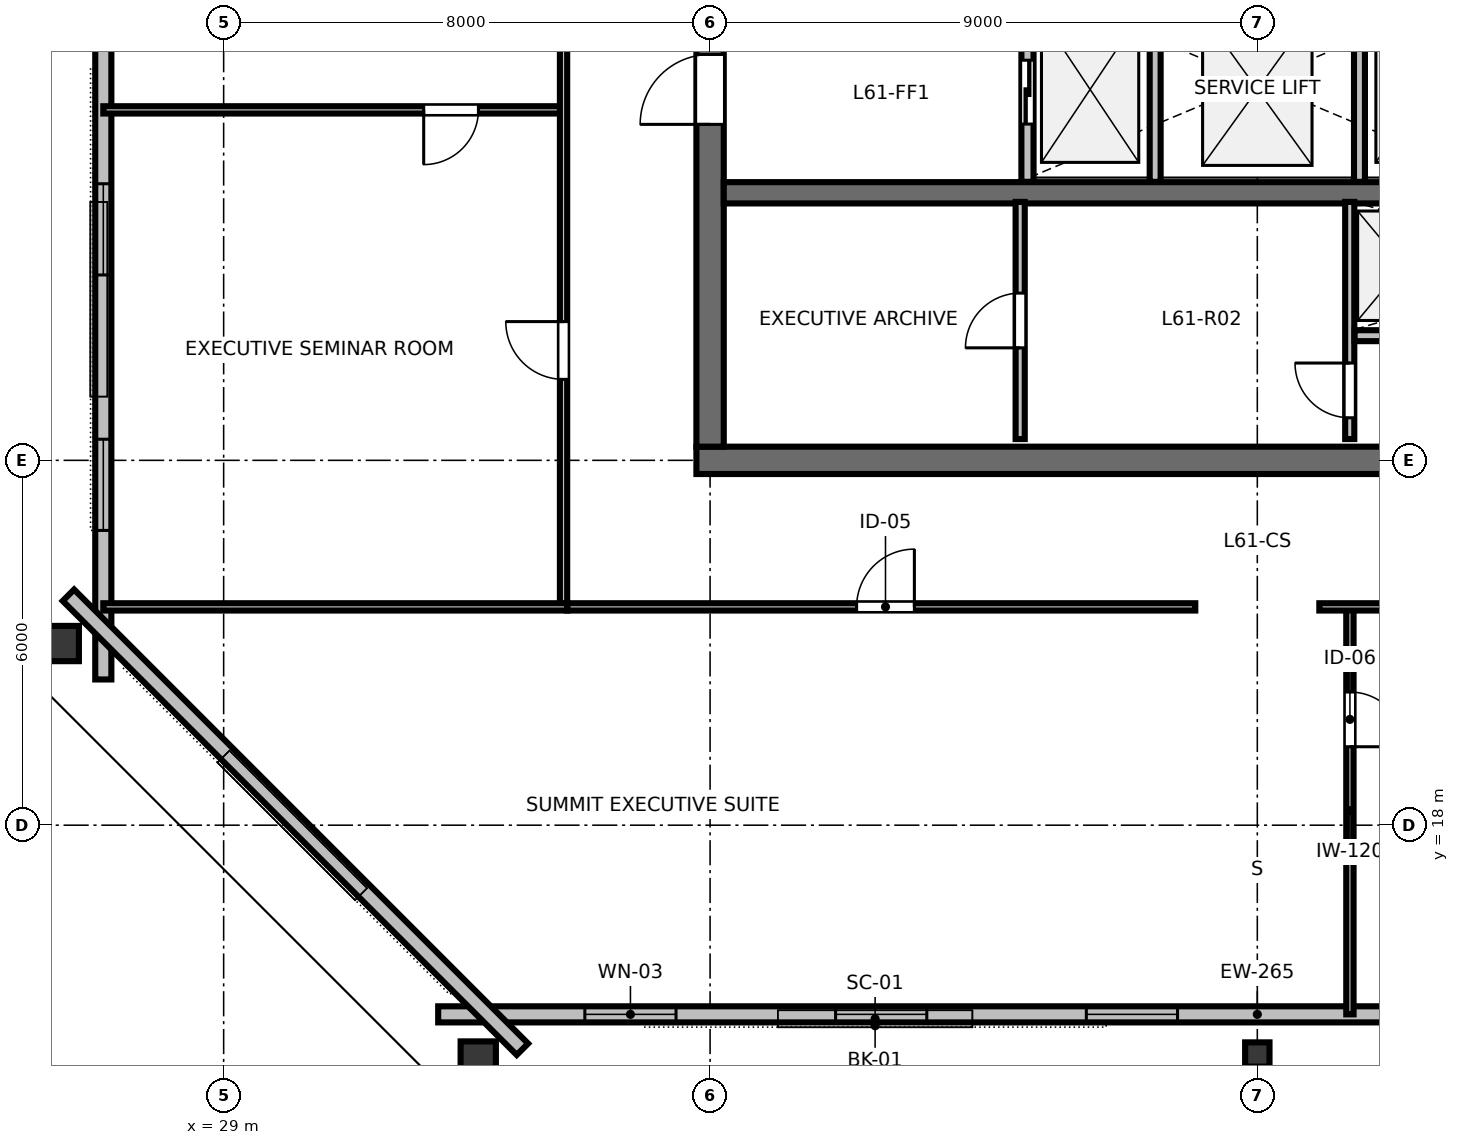
"""IFC4 building model, lengths in metres.
Left out: names, types, materials, properties, quantities, classifications, styles, units other than length and angle.
Written with IfcOpenShell. Run it as: python <this file> out.ifc"""

import sys

from ifc_helpers import new_model, si_unit, direction, frame, frame_2d, origin, origin_2d, place, context, subcontext, project, spatial, rectangle, hollow_rectangle, i_section, extrude, element, fill, save


model = new_model("IFC4")
c1 = context("Model", 3, precision=1e-05, world=origin(), true_north=direction((0.0, 1.0)))
c2 = subcontext(c1, "Body", "Model", "MODEL_VIEW")
j1 = project(units=[si_unit("LENGTHUNIT", "METRE"), si_unit("PLANEANGLEUNIT", "RADIAN")], contexts=[c1])
p1 = place(None, origin())
s1 = spatial("IfcSite", under=j1, at=p1, CompositionType="ELEMENT")
p2 = place(p1, origin())
s2 = spatial("IfcBuilding", under=s1, at=p2, CompositionType="ELEMENT")
p3 = place(p2, frame((0.0, 0.0, 231.0)))
s3 = spatial("IfcBuildingStorey", under=s2, at=p3, CompositionType="ELEMENT", Elevation=231.0)
p4 = place(p3, frame((36.775, 24.0, 0.0), z_axis=(0.0, 0.0, 1.0), x_axis=(1.0, 0.0, 0.0)))
e1 = element("IfcWall", 1, at=p4, inside=s3, PredefinedType="SHEAR", context=c2, shape_type="SweptSolid", body=[
    extrude(rectangle(XDim=18.45, YDim=0.45, at=frame_2d((9.225, 0.0))), origin(), (0.0, 0.0, 1.0), 3.28),
])
p5 = place(p4, frame((13.425, 0.0, 0.0)))
e2 = element("IfcOpeningElement", 2, at=p5, cuts=e1, PredefinedType="OPENING", context=c2, shape_type="SweptSolid", body=[
    extrude(rectangle(XDim=1.6, YDim=2.15, at=frame_2d((0.8, 1.075))), frame((0.0, 0.235, 0.0), z_axis=(0.0, -1.0, 0.0), x_axis=(1.0, 0.0, 0.0)), (0.0, 0.0, 1.0), 0.47),
])
p6 = place(p3, frame((37.0, 24.225, 0.0), z_axis=(0.0, 0.0, 1.0), x_axis=(0.0, 1.0, 0.0)))
e3 = element("IfcWall", 3, at=p6, inside=s3, PredefinedType="SHEAR", context=c2, shape_type="SweptSolid", body=[
    extrude(rectangle(XDim=15.55, YDim=0.45, at=frame_2d((7.775, 0.0))), origin(), (0.0, 0.0, 1.0), 3.28),
])
p7 = place(p6, frame((5.3, 0.0, 0.0)))
e4 = element("IfcOpeningElement", 4, at=p7, cuts=e3, PredefinedType="OPENING", context=c2, shape_type="SweptSolid", body=[
    extrude(rectangle(XDim=1.15, YDim=2.15, at=frame_2d((0.575, 1.075))), frame((0.0, 0.235, 0.0), z_axis=(0.0, -1.0, 0.0), x_axis=(1.0, 0.0, 0.0)), (0.0, 0.0, 1.0), 0.47),
])
p8 = place(p3, frame((37.225, 28.4, 0.0), z_axis=(0.0, 0.0, 1.0), x_axis=(1.0, 0.0, 0.0)))
e5 = element("IfcWall", 5, at=p8, inside=s3, PredefinedType="SHEAR", context=c2, shape_type="SweptSolid", body=[
    extrude(rectangle(XDim=17.55, YDim=0.35, at=frame_2d((8.775, 0.0))), origin(), (0.0, 0.0, 1.0), 3.28),
])
p9 = place(p3, frame((33.187, 14.094, 0.0), z_axis=(0.072351164075, 0.044894824887, 0.996368287209), x_axis=(-0.527254388164, 0.849707485057, 0.0)))
e6 = element("IfcColumn", 6, at=p9, inside=s3, PredefinedType="COLUMN", context=c2, shape_type="SweptSolid", body=[
    extrude(hollow_rectangle(XDim=0.58, YDim=0.7, WallThickness=0.032, at=origin_2d()), origin(), (0.0, 0.0, 1.0), 3.29),
])
p10 = place(p3, frame((46.0, 14.229, 0.0), z_axis=(0.0, 0.04434450837, 0.999016298454), x_axis=(-1.0, 0.0, 0.0)))
e7 = element("IfcColumn", 7, at=p10, inside=s3, PredefinedType="COLUMN", context=c2, shape_type="SweptSolid", body=[
    extrude(i_section(OverallWidth=0.401, OverallDepth=0.399, WebThickness=0.025, FlangeThickness=0.04, FilletRadius=0.025, at=origin_2d()), origin(), (0.0, 0.0, 1.0), 3.281),
])
p11 = place(p3, frame((26.27, 20.987, 0.0), z_axis=(0.062492571187, 0.054773773796, 0.996541274735), x_axis=(-0.749422115547, -0.656856913627, 0.083099264433)))
e8 = element("IfcColumn", 8, at=p11, inside=s3, PredefinedType="COLUMN", context=c2, shape_type="SweptSolid", body=[
    extrude(hollow_rectangle(XDim=0.58, YDim=0.7, WallThickness=0.032, at=origin_2d()), origin(), (0.0, 0.0, 1.0), 3.29),
])
p12 = place(p3, frame((32.528, 14.889, 0.0), z_axis=(0.0, 0.0, 1.0), x_axis=(1.0, 0.0, 0.0)))
e9 = element("IfcWall", 9, at=p12, inside=s3, PredefinedType="STANDARD", context=c2, shape_type="SweptSolid", body=[
    extrude(rectangle(XDim=26.943, YDim=0.265, at=frame_2d((13.472, 0.0))), origin(), (0.0, 0.0, 1.0), 3.28),
])
p13 = place(p12, frame((2.412, 0.0, 0.85)))
e10 = element("IfcOpeningElement", 10, at=p13, cuts=e9, PredefinedType="OPENING", context=c2, shape_type="SweptSolid", body=[
    extrude(rectangle(XDim=1.5, YDim=1.85, at=frame_2d((0.75, 0.925))), frame((0.0, 0.142, 0.0), z_axis=(0.0, -1.0, 0.0), x_axis=(1.0, 0.0, 0.0)), (0.0, 0.0, 1.0), 0.285),
])
p14 = place(p12, frame((6.536, 0.0, 0.85)))
e11 = element("IfcOpeningElement", 11, at=p14, cuts=e9, PredefinedType="OPENING", context=c2, shape_type="SweptSolid", body=[
    extrude(rectangle(XDim=1.5, YDim=1.85, at=frame_2d((0.75, 0.925))), frame((0.0, 0.142, 0.0), z_axis=(0.0, -1.0, 0.0), x_axis=(1.0, 0.0, 0.0)), (0.0, 0.0, 1.0), 0.285),
])
p15 = place(p12, frame((10.66, 0.0, 0.85)))
e12 = element("IfcOpeningElement", 12, at=p15, cuts=e9, PredefinedType="OPENING", context=c2, shape_type="SweptSolid", body=[
    extrude(rectangle(XDim=1.5, YDim=1.85, at=frame_2d((0.75, 0.925))), frame((0.0, 0.142, 0.0), z_axis=(0.0, -1.0, 0.0), x_axis=(1.0, 0.0, 0.0)), (0.0, 0.0, 1.0), 0.285),
])
p16 = place(p12, frame((18.908, 0.0, 0.85)))
e13 = element("IfcOpeningElement", 13, at=p16, cuts=e9, PredefinedType="OPENING", context=c2, shape_type="SweptSolid", body=[
    extrude(rectangle(XDim=1.5, YDim=1.85, at=frame_2d((0.75, 0.925))), frame((0.0, 0.142, 0.0), z_axis=(0.0, -1.0, 0.0), x_axis=(1.0, 0.0, 0.0)), (0.0, 0.0, 1.0), 0.285),
])
p17 = place(p12, frame((23.031, 0.0, 0.85)))
e14 = element("IfcOpeningElement", 14, at=p17, cuts=e9, PredefinedType="OPENING", context=c2, shape_type="SweptSolid", body=[
    extrude(rectangle(XDim=1.5, YDim=1.85, at=frame_2d((0.75, 0.925))), frame((0.0, 0.142, 0.0), z_axis=(0.0, -1.0, 0.0), x_axis=(1.0, 0.0, 0.0)), (0.0, 0.0, 1.0), 0.285),
])
p18 = place(p3, frame((27.021, 43.604, 0.0), z_axis=(0.0, 0.0, 1.0), x_axis=(0.0, -1.0, 0.0)))
e15 = element("IfcWall", 15, at=p18, inside=s3, PredefinedType="STANDARD", context=c2, shape_type="SweptSolid", body=[
    extrude(rectangle(XDim=23.207, YDim=0.265, at=frame_2d((11.604, 0.0))), origin(), (0.0, 0.0, 1.0), 3.28),
])
p19 = place(p18, frame((2.451, 0.0, 0.85)))
e16 = element("IfcOpeningElement", 16, at=p19, cuts=e15, PredefinedType="OPENING", context=c2, shape_type="SweptSolid", body=[
    extrude(rectangle(XDim=1.5, YDim=1.85, at=frame_2d((0.75, 0.925))), frame((0.0, 0.142, 0.0), z_axis=(0.0, -1.0, 0.0), x_axis=(1.0, 0.0, 0.0)), (0.0, 0.0, 1.0), 0.285),
])
p20 = place(p18, frame((6.652, 0.0, 0.85)))
e17 = element("IfcOpeningElement", 17, at=p20, cuts=e15, PredefinedType="OPENING", context=c2, shape_type="SweptSolid", body=[
    extrude(rectangle(XDim=1.5, YDim=1.85, at=frame_2d((0.75, 0.925))), frame((0.0, 0.142, 0.0), z_axis=(0.0, -1.0, 0.0), x_axis=(1.0, 0.0, 0.0)), (0.0, 0.0, 1.0), 0.285),
])
p21 = place(p18, frame((15.055, 0.0, 0.85)))
e18 = element("IfcOpeningElement", 18, at=p21, cuts=e15, PredefinedType="OPENING", context=c2, shape_type="SweptSolid", body=[
    extrude(rectangle(XDim=1.5, YDim=1.85, at=frame_2d((0.75, 0.925))), frame((0.0, 0.142, 0.0), z_axis=(0.0, -1.0, 0.0), x_axis=(1.0, 0.0, 0.0)), (0.0, 0.0, 1.0), 0.285),
])
p22 = place(p18, frame((19.257, 0.0, 0.85)))
e19 = element("IfcOpeningElement", 19, at=p22, cuts=e15, PredefinedType="OPENING", context=c2, shape_type="SweptSolid", body=[
    extrude(rectangle(XDim=1.5, YDim=1.85, at=frame_2d((0.75, 0.925))), frame((0.0, 0.142, 0.0), z_axis=(0.0, -1.0, 0.0), x_axis=(1.0, 0.0, 0.0)), (0.0, 0.0, 1.0), 0.285),
])
p23 = place(p3, frame((26.447, 21.782, 0.0), z_axis=(0.0, 0.0, 1.0), x_axis=(0.707106781187, -0.707106781187, 0.0)))
e20 = element("IfcWall", 20, at=p23, inside=s3, PredefinedType="STANDARD", context=c2, shape_type="SweptSolid", body=[
    extrude(rectangle(XDim=10.56, YDim=0.265, at=frame_2d((5.28, 0.0))), origin(), (0.0, 0.0, 1.0), 2.343),
])
p24 = place(p3, frame((42.22, 28.58, 0.0), z_axis=(0.0, 0.0, 1.0), x_axis=(0.0, 1.0, 0.0)))
e21 = element("IfcWall", 21, at=p24, inside=s3, PredefinedType="PARTITIONING", context=c2, shape_type="SweptSolid", body=[
    extrude(rectangle(XDim=3.04, YDim=0.2, at=frame_2d((1.52, 0.0))), origin(), (0.0, 0.0, 1.0), 3.28),
])
p25 = place(p24, frame((0.95, 0.0, 0.0)))
e22 = element("IfcOpeningElement", 22, at=p25, cuts=e21, PredefinedType="OPENING", context=c2, shape_type="SweptSolid", body=[
    extrude(rectangle(XDim=1.05, YDim=2.15, at=frame_2d((0.525, 1.075))), frame((0.0, 0.11, 0.0), z_axis=(0.0, -1.0, 0.0), x_axis=(1.0, 0.0, 0.0)), (0.0, 0.0, 1.0), 0.22),
])
for number, where, z_axis, x_axis in (
    (23, (44.32, 28.58, 0.0), (0.0, 0.0, 1.0), (0.0, 1.0, 0.0)),
    (24, (47.68, 28.58, 0.0), (0.0, 0.0, 1.0), (0.0, 1.0, 0.0)),
):
    element("IfcWall", number, at=place(p3, frame(where, z_axis=z_axis, x_axis=x_axis)), inside=s3, PredefinedType="PARTITIONING", context=c2, shape_type="SweptSolid", body=[
        extrude(rectangle(XDim=3.04, YDim=0.18, at=frame_2d((1.52, 0.0))), origin(), (0.0, 0.0, 1.0), 3.28),
    ])
p26 = place(p3, frame((42.1, 24.35, 0.0), z_axis=(0.0, 0.0, 1.0), x_axis=(0.0, 1.0, 0.0)))
e25 = element("IfcWall", 25, at=p26, inside=s3, PredefinedType="PARTITIONING", context=c2, shape_type="SweptSolid", body=[
    extrude(rectangle(XDim=3.9, YDim=0.15, at=frame_2d((1.95, 0.0))), origin(), (0.0, 0.0, 1.0), 3.28),
])
p27 = place(p26, frame((1.5, 0.0, 0.0)))
e26 = element("IfcOpeningElement", 26, at=p27, cuts=e25, PredefinedType="OPENING", context=c2, shape_type="SweptSolid", body=[
    extrude(rectangle(XDim=0.9, YDim=2.15, at=frame_2d((0.45, 1.075))), frame((0.0, 0.085, 0.0), z_axis=(0.0, -1.0, 0.0), x_axis=(1.0, 0.0, 0.0)), (0.0, 0.0, 1.0), 0.17),
])
p28 = place(p3, frame((47.52, 24.35, 0.0), z_axis=(0.0, 0.0, 1.0), x_axis=(0.0, 1.0, 0.0)))
e27 = element("IfcWall", 27, at=p28, inside=s3, PredefinedType="PARTITIONING", context=c2, shape_type="SweptSolid", body=[
    extrude(rectangle(XDim=3.9, YDim=0.15, at=frame_2d((1.95, 0.0))), origin(), (0.0, 0.0, 1.0), 3.28),
])
p29 = place(p28, frame((0.35, 0.0, 0.0)))
e28 = element("IfcOpeningElement", 28, at=p29, cuts=e27, PredefinedType="OPENING", context=c2, shape_type="SweptSolid", body=[
    extrude(rectangle(XDim=0.9, YDim=2.15, at=frame_2d((0.45, 1.075))), frame((0.0, 0.085, 0.0), z_axis=(0.0, -1.0, 0.0), x_axis=(1.0, 0.0, 0.0)), (0.0, 0.0, 1.0), 0.17),
])
p30 = place(p3, frame((47.6, 26.05, 0.0), z_axis=(0.0, 0.0, 1.0), x_axis=(1.0, 0.0, 0.0)))
e29 = element("IfcWall", 29, at=p30, inside=s3, PredefinedType="PARTITIONING", context=c2, shape_type="SweptSolid", body=[
    extrude(rectangle(XDim=7.0, YDim=0.18, at=frame_2d((3.5, 0.0))), origin(), (0.0, 0.0, 1.0), 3.28),
])
p31 = place(p30, frame((1.2, 0.0, 0.0)))
e30 = element("IfcOpeningElement", 30, at=p31, cuts=e29, PredefinedType="OPENING", context=c2, shape_type="SweptSolid", body=[
    extrude(rectangle(XDim=1.05, YDim=2.15, at=frame_2d((0.525, 1.075))), frame((0.0, 0.1, 0.0), z_axis=(0.0, -1.0, 0.0), x_axis=(1.0, 0.0, 0.0)), (0.0, 0.0, 1.0), 0.2),
])
p32 = place(p30, frame((3.4, 0.0, 0.0)))
e31 = element("IfcOpeningElement", 31, at=p32, cuts=e29, PredefinedType="OPENING", context=c2, shape_type="SweptSolid", body=[
    extrude(rectangle(XDim=1.05, YDim=2.15, at=frame_2d((0.525, 1.075))), frame((0.0, 0.1, 0.0), z_axis=(0.0, -1.0, 0.0), x_axis=(1.0, 0.0, 0.0)), (0.0, 0.0, 1.0), 0.2),
])
p33 = place(p3, frame((47.523, 21.59, 0.0), z_axis=(0.0, 0.0, 1.0), x_axis=(0.0, -1.0, 0.0)))
e32 = element("IfcWall", 32, at=p33, inside=s3, PredefinedType="PARTITIONING", context=c2, shape_type="SweptSolid", body=[
    extrude(rectangle(XDim=6.701, YDim=0.12, at=frame_2d((3.351, 0.0))), origin(), (0.0, 0.0, 1.0), 2.56),
])
p34 = place(p33, frame((1.4, 0.0, 0.0)))
e33 = element("IfcOpeningElement", 33, at=p34, cuts=e32, PredefinedType="OPENING", context=c2, shape_type="SweptSolid", body=[
    extrude(rectangle(XDim=0.9, YDim=2.15, at=frame_2d((0.45, 1.075))), frame((0.0, 0.07, 0.0), z_axis=(0.0, -1.0, 0.0), x_axis=(1.0, 0.0, 0.0)), (0.0, 0.0, 1.0), 0.14),
])
p35 = place(p3, frame((34.65, 21.59, 0.0), z_axis=(0.0, 0.0, 1.0), x_axis=(1.0, 0.0, 0.0)))
e34 = element("IfcWall", 34, at=p35, inside=s3, PredefinedType="PARTITIONING", context=c2, shape_type="SweptSolid", body=[
    extrude(rectangle(XDim=10.33, YDim=0.12, at=frame_2d((5.165, 0.0))), origin(), (0.0, 0.0, 1.0), 2.56),
])
p36 = place(p35, frame((4.76, 0.0, 0.0)))
e35 = element("IfcOpeningElement", 35, at=p36, cuts=e34, PredefinedType="OPENING", context=c2, shape_type="SweptSolid", body=[
    extrude(rectangle(XDim=0.95, YDim=2.15, at=frame_2d((0.475, 1.075))), frame((0.0, 0.07, 0.0), z_axis=(0.0, -1.0, 0.0), x_axis=(1.0, 0.0, 0.0)), (0.0, 0.0, 1.0), 0.14),
])
p37 = place(p3, frame((47.02, 21.59, 0.0), z_axis=(0.0, 0.0, 1.0), x_axis=(1.0, 0.0, 0.0)))
e36 = element("IfcWall", 36, at=p37, inside=s3, PredefinedType="PARTITIONING", context=c2, shape_type="SweptSolid", body=[
    extrude(rectangle(XDim=10.33, YDim=0.12, at=frame_2d((5.165, 0.0))), origin(), (0.0, 0.0, 1.0), 2.56),
])
p38 = place(p37, frame((4.872, 0.0, 0.0)))
e37 = element("IfcOpeningElement", 37, at=p38, cuts=e36, PredefinedType="OPENING", context=c2, shape_type="SweptSolid", body=[
    extrude(rectangle(XDim=0.95, YDim=2.15, at=frame_2d((0.475, 1.075))), frame((0.0, 0.07, 0.0), z_axis=(0.0, -1.0, 0.0), x_axis=(1.0, 0.0, 0.0)), (0.0, 0.0, 1.0), 0.14),
])
p39 = place(p3, frame((34.59, 29.763, 0.0), z_axis=(0.0, 0.0, 1.0), x_axis=(-1.0, 0.0, 0.0)))
e38 = element("IfcWall", 38, at=p39, inside=s3, PredefinedType="PARTITIONING", context=c2, shape_type="SweptSolid", body=[
    extrude(rectangle(XDim=7.569, YDim=0.12, at=frame_2d((3.785, 0.0))), origin(), (0.0, 0.0, 1.0), 2.56),
])
p40 = place(p39, frame((1.4, 0.0, 0.0)))
e39 = element("IfcOpeningElement", 39, at=p40, cuts=e38, PredefinedType="OPENING", context=c2, shape_type="SweptSolid", body=[
    extrude(rectangle(XDim=0.9, YDim=2.15, at=frame_2d((0.45, 1.075))), frame((0.0, 0.07, 0.0), z_axis=(0.0, -1.0, 0.0), x_axis=(1.0, 0.0, 0.0)), (0.0, 0.0, 1.0), 0.14),
])
p41 = place(p3, frame((34.59, 21.65, 0.0), z_axis=(0.0, 0.0, 1.0), x_axis=(0.0, 1.0, 0.0)))
e40 = element("IfcWall", 40, at=p41, inside=s3, PredefinedType="PARTITIONING", context=c2, shape_type="SweptSolid", body=[
    extrude(rectangle(XDim=20.7, YDim=0.12, at=frame_2d((10.35, 0.0))), origin(), (0.0, 0.0, 1.0), 2.56),
])
p42 = place(p41, frame((3.682, 0.0, 0.0)))
e41 = element("IfcOpeningElement", 41, at=p42, cuts=e40, PredefinedType="OPENING", context=c2, shape_type="SweptSolid", body=[
    extrude(rectangle(XDim=0.95, YDim=2.15, at=frame_2d((0.475, 1.075))), frame((0.0, 0.07, 0.0), z_axis=(0.0, -1.0, 0.0), x_axis=(1.0, 0.0, 0.0)), (0.0, 0.0, 1.0), 0.14),
])
p43 = place(p41, frame((13.832, 0.0, 0.0)))
e42 = element("IfcOpeningElement", 42, at=p43, cuts=e40, PredefinedType="OPENING", context=c2, shape_type="SweptSolid", body=[
    extrude(rectangle(XDim=0.95, YDim=2.15, at=frame_2d((0.475, 1.075))), frame((0.0, 0.07, 0.0), z_axis=(0.0, -1.0, 0.0), x_axis=(1.0, 0.0, 0.0)), (0.0, 0.0, 1.0), 0.14),
])
p44 = place(p3, frame((34.65, 21.59, 0.0), z_axis=(0.0, 0.0, 1.0), x_axis=(-1.0, 0.0, 0.0)))
e43 = element("IfcWall", 43, at=p44, inside=s3, PredefinedType="PARTITIONING", context=c2, shape_type="SweptSolid", body=[
    extrude(rectangle(XDim=7.629, YDim=0.12, at=frame_2d((3.814, 0.0))), origin(), (0.0, 0.0, 1.0), 2.56),
])
p45 = place(p13, origin())
e44 = element("IfcWindow", 44, at=p45, inside=s3, PartitioningType="SINGLE_PANEL", PredefinedType="WINDOW", context=c2, shape_type="SweptSolid", body=[
    extrude(rectangle(XDim=1.5, YDim=1.85, at=frame_2d((0.75, 0.925))), frame((0.0, 0.03, 0.0), z_axis=(0.0, -1.0, 0.0), x_axis=(1.0, 0.0, 0.0)), (0.0, 0.0, 1.0), 0.06),
])
fill(e10, e44)
p46 = place(p14, origin())
e45 = element("IfcWindow", 45, at=p46, inside=s3, PartitioningType="SINGLE_PANEL", PredefinedType="WINDOW", context=c2, shape_type="SweptSolid", body=[
    extrude(rectangle(XDim=1.5, YDim=1.85, at=frame_2d((0.75, 0.925))), frame((0.0, 0.03, 0.0), z_axis=(0.0, -1.0, 0.0), x_axis=(1.0, 0.0, 0.0)), (0.0, 0.0, 1.0), 0.06),
])
fill(e11, e45)
p47 = place(p15, origin())
e46 = element("IfcWindow", 46, at=p47, inside=s3, PartitioningType="SINGLE_PANEL", PredefinedType="WINDOW", context=c2, shape_type="SweptSolid", body=[
    extrude(rectangle(XDim=1.5, YDim=1.85, at=frame_2d((0.75, 0.925))), frame((0.0, 0.03, 0.0), z_axis=(0.0, -1.0, 0.0), x_axis=(1.0, 0.0, 0.0)), (0.0, 0.0, 1.0), 0.06),
])
fill(e12, e46)
p48 = place(p21, origin())
e47 = element("IfcWindow", 47, at=p48, inside=s3, PartitioningType="SINGLE_PANEL", PredefinedType="WINDOW", context=c2, shape_type="SweptSolid", body=[
    extrude(rectangle(XDim=1.5, YDim=1.85, at=frame_2d((0.75, 0.925))), frame((0.0, 0.03, 0.0), z_axis=(0.0, -1.0, 0.0), x_axis=(1.0, 0.0, 0.0)), (0.0, 0.0, 1.0), 0.06),
])
fill(e18, e47)
p49 = place(p22, origin())
e48 = element("IfcWindow", 48, at=p49, inside=s3, PartitioningType="SINGLE_PANEL", PredefinedType="WINDOW", context=c2, shape_type="SweptSolid", body=[
    extrude(rectangle(XDim=1.5, YDim=1.85, at=frame_2d((0.75, 0.925))), frame((0.0, 0.03, 0.0), z_axis=(0.0, -1.0, 0.0), x_axis=(1.0, 0.0, 0.0)), (0.0, 0.0, 1.0), 0.06),
])
fill(e19, e48)
p50 = place(p7, origin())
e49 = element("IfcDoor", 49, at=p50, inside=s3, OperationType="SINGLE_SWING_LEFT", PredefinedType="DOOR", context=c2, shape_type="SweptSolid", body=[
    extrude(rectangle(XDim=1.15, YDim=2.15, at=frame_2d((0.575, 1.075))), frame((0.0, 0.025, 0.0), z_axis=(0.0, -1.0, 0.0), x_axis=(1.0, 0.0, 0.0)), (0.0, 0.0, 1.0), 0.05),
])
fill(e4, e49)
p51 = place(p25, origin())
e50 = element("IfcDoor", 50, at=p51, inside=s3, OperationType="SLIDING_TO_LEFT", PredefinedType="DOOR", context=c2, shape_type="SweptSolid", body=[
    extrude(rectangle(XDim=1.05, YDim=2.15, at=frame_2d((0.525, 1.075))), frame((0.0, 0.025, 0.0), z_axis=(0.0, -1.0, 0.0), x_axis=(1.0, 0.0, 0.0)), (0.0, 0.0, 1.0), 0.05),
])
fill(e22, e50)
p52 = place(p27, origin())
e51 = element("IfcDoor", 51, at=p52, inside=s3, OperationType="SINGLE_SWING_LEFT", PredefinedType="DOOR", context=c2, shape_type="SweptSolid", body=[
    extrude(rectangle(XDim=0.9, YDim=2.15, at=frame_2d((0.45, 1.075))), frame((0.0, 0.025, 0.0), z_axis=(0.0, -1.0, 0.0), x_axis=(1.0, 0.0, 0.0)), (0.0, 0.0, 1.0), 0.05),
])
fill(e26, e51)
p53 = place(p29, origin())
e52 = element("IfcDoor", 52, at=p53, inside=s3, OperationType="SINGLE_SWING_RIGHT", PredefinedType="DOOR", context=c2, shape_type="SweptSolid", body=[
    extrude(rectangle(XDim=0.9, YDim=2.15, at=frame_2d((0.45, 1.075))), frame((0.0, 0.025, 0.0), z_axis=(0.0, -1.0, 0.0), x_axis=(1.0, 0.0, 0.0)), (0.0, 0.0, 1.0), 0.05),
])
fill(e28, e52)
p54 = place(p34, origin())
e53 = element("IfcDoor", 53, at=p54, inside=s3, OperationType="SINGLE_SWING_RIGHT", PredefinedType="DOOR", context=c2, shape_type="SweptSolid", body=[
    extrude(rectangle(XDim=0.9, YDim=2.15, at=frame_2d((0.45, 1.075))), frame((0.0, 0.025, 0.0), z_axis=(0.0, -1.0, 0.0), x_axis=(1.0, 0.0, 0.0)), (0.0, 0.0, 1.0), 0.05),
])
fill(e33, e53)
p55 = place(p36, origin())
e54 = element("IfcDoor", 54, at=p55, inside=s3, OperationType="SINGLE_SWING_RIGHT", PredefinedType="DOOR", context=c2, shape_type="SweptSolid", body=[
    extrude(rectangle(XDim=0.95, YDim=2.15, at=frame_2d((0.475, 1.075))), frame((0.0, 0.025, 0.0), z_axis=(0.0, -1.0, 0.0), x_axis=(1.0, 0.0, 0.0)), (0.0, 0.0, 1.0), 0.05),
])
fill(e35, e54)
p56 = place(p40, origin())
e55 = element("IfcDoor", 55, at=p56, inside=s3, OperationType="SINGLE_SWING_RIGHT", PredefinedType="DOOR", context=c2, shape_type="SweptSolid", body=[
    extrude(rectangle(XDim=0.9, YDim=2.15, at=frame_2d((0.45, 1.075))), frame((0.0, 0.025, 0.0), z_axis=(0.0, -1.0, 0.0), x_axis=(1.0, 0.0, 0.0)), (0.0, 0.0, 1.0), 0.05),
])
fill(e39, e55)
p57 = place(p42, origin())
e56 = element("IfcDoor", 56, at=p57, inside=s3, OperationType="SINGLE_SWING_RIGHT", PredefinedType="DOOR", context=c2, shape_type="SweptSolid", body=[
    extrude(rectangle(XDim=0.95, YDim=2.15, at=frame_2d((0.475, 1.075))), frame((0.0, 0.025, 0.0), z_axis=(0.0, -1.0, 0.0), x_axis=(1.0, 0.0, 0.0)), (0.0, 0.0, 1.0), 0.05),
])
fill(e41, e56)
save(model, sys.argv[1])
